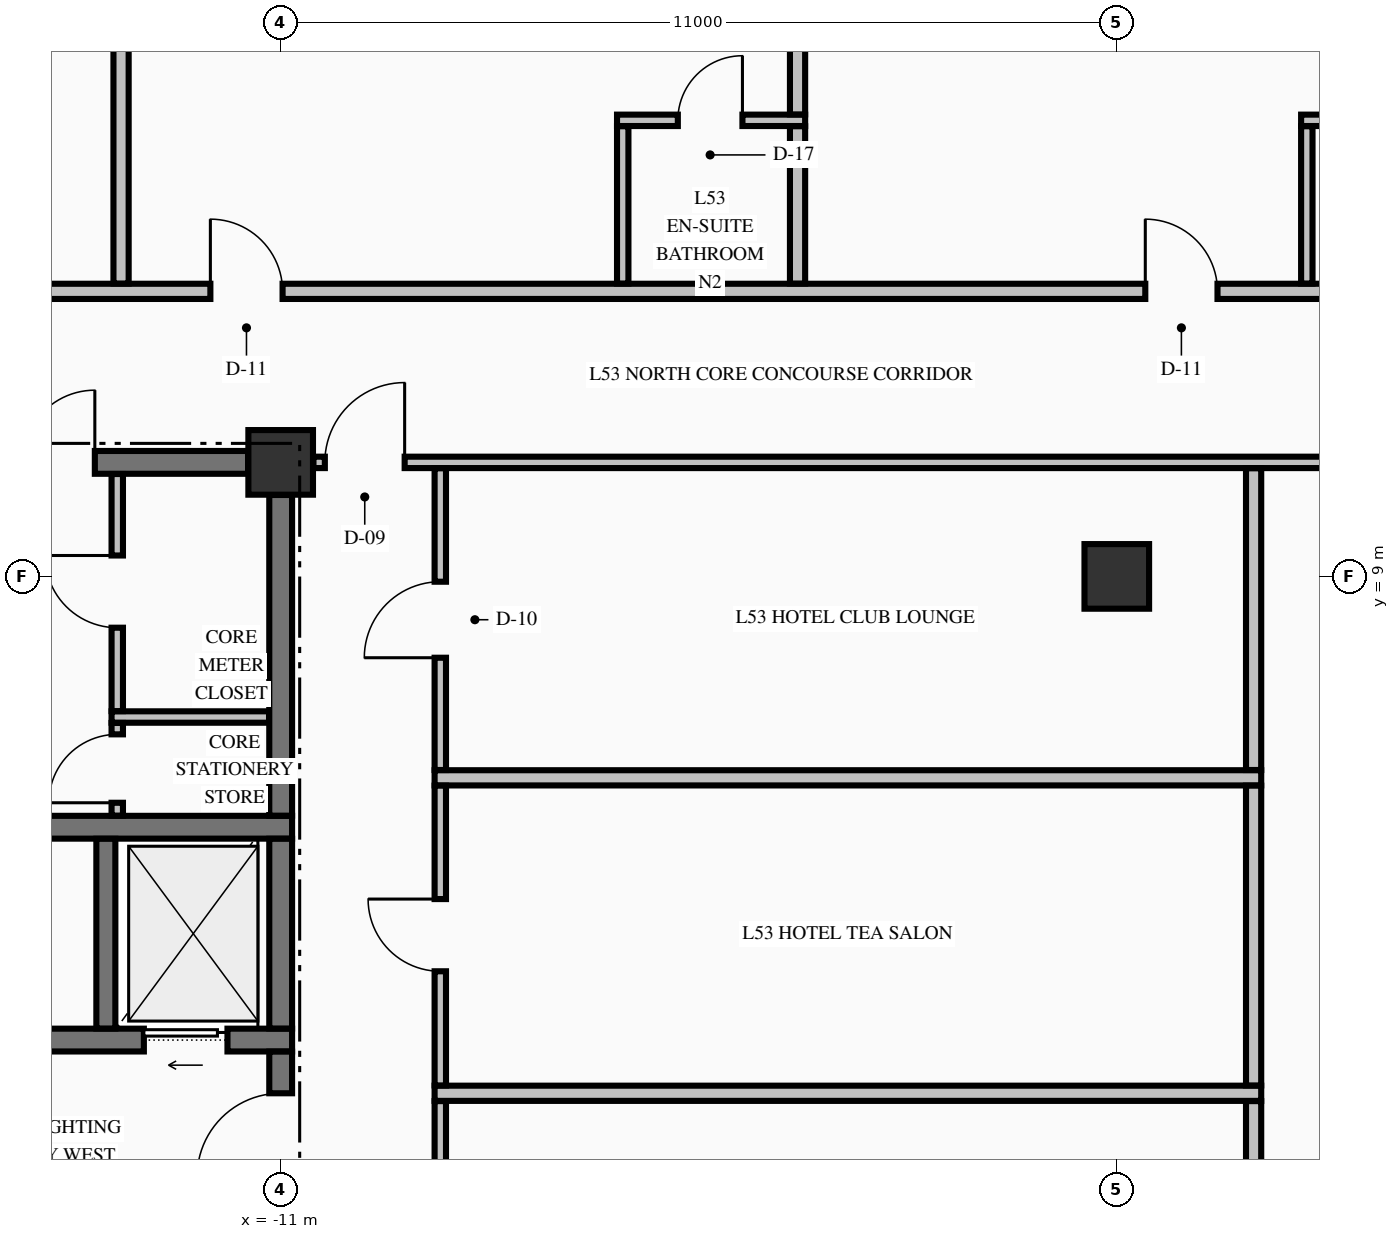
"""IFC4 building model, lengths in metres.
Left out: names, types, materials, properties, quantities, classifications, styles, units other than length and angle.
Written with IfcOpenShell. Run it as: python <this file> out.ifc"""

import sys

from ifc_helpers import new_model, si_unit, direction, frame, frame_2d, origin, origin_2d, place, context, subcontext, project, spatial, rectangle, extrude, element, fill, save


model = new_model("IFC4")
c1 = context("Model", 3, precision=1e-05, world=origin(), true_north=direction((0.0, 1.0)))
c2 = subcontext(c1, "Body", "Model", "MODEL_VIEW")
j1 = project(units=[si_unit("LENGTHUNIT", "METRE"), si_unit("PLANEANGLEUNIT", "RADIAN")], contexts=[c1])
p1 = place(None, origin())
s1 = spatial("IfcSite", under=j1, at=p1, CompositionType="ELEMENT")
p2 = place(p1, origin())
s2 = spatial("IfcBuilding", under=s1, at=p2, CompositionType="ELEMENT")
p3 = place(p2, frame((0.0, 0.0, 205.06)))
s3 = spatial("IfcBuildingStorey", under=s2, at=p3, CompositionType="ELEMENT", Elevation=205.06)
for number, where, z_axis, x_axis in (
    (1, (-11.0, 10.5, -0.25), (0.0, 0.0, 1.0), (1.0, 0.0, 0.0)),
    (2, (0.0, 9.0, -0.25), (0.0, 0.0, 1.0), (1.0, 0.0, 0.0)),
):
    element("IfcColumn", number, at=place(p3, frame(where, z_axis=z_axis, x_axis=x_axis)), inside=s3, PredefinedType="COLUMN", context=c2, shape_type="SweptSolid", body=[
        extrude(rectangle(XDim=0.85, YDim=0.85, at=origin_2d()), origin(), (0.0, 0.0, 1.0), 3.4),
    ])
p4 = place(p3, frame((-14.875, 2.9, 0.0), z_axis=(0.0, 0.0, 1.0), x_axis=(1.0, 0.0, 0.0)))
e3 = element("IfcWall", 3, at=p4, inside=s3, PredefinedType="SHEAR", context=c2, shape_type="SweptSolid", body=[
    extrude(rectangle(XDim=4.025, YDim=0.3, at=frame_2d((2.012, 0.0))), origin(), (0.0, 0.0, 1.0), 3.15),
])
p5 = place(p4, frame((2.075, 0.0, 0.0)))
e4 = element("IfcOpeningElement", 4, at=p5, cuts=e3, PredefinedType="OPENING", context=c2, shape_type="SweptSolid", body=[
    extrude(rectangle(XDim=1.1, YDim=2.2, at=frame_2d((0.55, 1.1))), frame((0.0, 0.16, 0.0), z_axis=(0.0, -1.0, 0.0), x_axis=(1.0, 0.0, 0.0)), (0.0, 0.0, 1.0), 0.32),
])
p6 = place(p3, frame((-14.875, 5.7, 0.0), z_axis=(0.0, 0.0, 1.0), x_axis=(1.0, 0.0, 0.0)))
e5 = element("IfcWall", 5, at=p6, inside=s3, PredefinedType="SHEAR", context=c2, shape_type="SweptSolid", body=[
    extrude(rectangle(XDim=4.025, YDim=0.3, at=frame_2d((2.012, 0.0))), origin(), (0.0, 0.0, 1.0), 3.15),
])
p7 = place(p3, frame((-14.7, 10.5, 0.0), z_axis=(0.0, 0.0, 1.0), x_axis=(1.0, 0.0, 0.0)))
e6 = element("IfcWall", 6, at=p7, inside=s3, PredefinedType="SHEAR", context=c2, shape_type="SweptSolid", body=[
    extrude(rectangle(XDim=3.271, YDim=0.3, at=frame_2d((1.635, 0.0))), origin(), (0.0, 0.0, 1.0), 3.15),
])
p8 = place(p7, frame((0.305, 0.0, 0.0)))
e7 = element("IfcOpeningElement", 7, at=p8, cuts=e6, PredefinedType="OPENING", context=c2, shape_type="SweptSolid", body=[
    extrude(rectangle(XDim=0.95, YDim=2.15, at=frame_2d((0.475, 1.075))), frame((0.0, 0.16, 0.0), z_axis=(0.0, -1.0, 0.0), x_axis=(1.0, 0.0, 0.0)), (0.0, 0.0, 1.0), 0.32),
])
for number, where, z_axis, x_axis in (
    (8, (-8.975, 2.2, 0.0), (0.0, 0.0, 1.0), (1.0, 0.0, 0.0)),
    (9, (-8.975, 6.35, 0.0), (0.0, 0.0, 1.0), (1.0, 0.0, 0.0)),
):
    element("IfcWall", number, at=place(p3, frame(where, z_axis=z_axis, x_axis=x_axis)), inside=s3, PredefinedType="PARTITIONING", context=c2, shape_type="SweptSolid", body=[
        extrude(rectangle(XDim=10.875, YDim=0.2, at=frame_2d((5.438, 0.0))), origin(), (0.0, 0.0, 1.0), 3.15),
    ])
p9 = place(p3, frame((-13.225, 7.15, 0.0), z_axis=(0.0, 0.0, 1.0), x_axis=(1.0, 0.0, 0.0)))
e10 = element("IfcWall", 10, at=p9, inside=s3, PredefinedType="PARTITIONING", context=c2, shape_type="SweptSolid", body=[
    extrude(rectangle(XDim=2.072, YDim=0.15, at=frame_2d((1.036, 0.0))), origin(), (0.0, 0.0, 1.0), 3.15),
])
p10 = place(p3, frame((-10.569, 10.5, 0.0), z_axis=(0.0, 0.0, 1.0), x_axis=(1.0, 0.0, 0.0)))
e11 = element("IfcWall", 11, at=p10, inside=s3, PredefinedType="PARTITIONING", context=c2, shape_type="SweptSolid", body=[
    extrude(rectangle(XDim=21.138, YDim=0.15, at=frame_2d((10.569, 0.0))), origin(), (0.0, 0.0, 1.0), 3.15),
])
p11 = place(p10, frame((0.15, 0.0, 0.0)))
e12 = element("IfcOpeningElement", 12, at=p11, cuts=e11, PredefinedType="OPENING", context=c2, shape_type="SweptSolid", body=[
    extrude(rectangle(XDim=1.05, YDim=2.15, at=frame_2d((0.525, 1.075))), frame((0.0, 0.085, 0.0), z_axis=(0.0, -1.0, 0.0), x_axis=(1.0, 0.0, 0.0)), (0.0, 0.0, 1.0), 0.17),
])
p12 = place(p10, frame((19.938, 0.0, 0.0)))
e13 = element("IfcOpeningElement", 13, at=p12, cuts=e11, PredefinedType="OPENING", context=c2, shape_type="SweptSolid", body=[
    extrude(rectangle(XDim=1.05, YDim=2.15, at=frame_2d((0.525, 1.075))), frame((0.0, 0.085, 0.0), z_axis=(0.0, -1.0, 0.0), x_axis=(1.0, 0.0, 0.0)), (0.0, 0.0, 1.0), 0.17),
])
p13 = place(p3, frame((-22.1, 12.75, 0.0), z_axis=(0.0, 0.0, 1.0), x_axis=(1.0, 0.0, 0.0)))
e14 = element("IfcWall", 14, at=p13, inside=s3, PredefinedType="PARTITIONING", context=c2, shape_type="SweptSolid", body=[
    extrude(rectangle(XDim=39.2, YDim=0.2, at=frame_2d((19.6, 0.0))), origin(), (0.0, 0.0, 1.0), 3.15),
])
p14 = place(p13, frame((5.125, 0.0, 0.0)))
e15 = element("IfcOpeningElement", 15, at=p14, cuts=e14, PredefinedType="OPENING", context=c2, shape_type="SweptSolid", body=[
    extrude(rectangle(XDim=1.05, YDim=2.15, at=frame_2d((0.525, 1.075))), frame((0.0, 0.11, 0.0), z_axis=(0.0, -1.0, 0.0), x_axis=(1.0, 0.0, 0.0)), (0.0, 0.0, 1.0), 0.22),
])
p15 = place(p13, frame((10.175, 0.0, 0.0)))
e16 = element("IfcOpeningElement", 16, at=p15, cuts=e14, PredefinedType="OPENING", context=c2, shape_type="SweptSolid", body=[
    extrude(rectangle(XDim=0.95, YDim=2.15, at=frame_2d((0.475, 1.075))), frame((0.0, 0.11, 0.0), z_axis=(0.0, -1.0, 0.0), x_axis=(1.0, 0.0, 0.0)), (0.0, 0.0, 1.0), 0.22),
])
p16 = place(p13, frame((22.475, 0.0, 0.0)))
e17 = element("IfcOpeningElement", 17, at=p16, cuts=e14, PredefinedType="OPENING", context=c2, shape_type="SweptSolid", body=[
    extrude(rectangle(XDim=0.95, YDim=2.15, at=frame_2d((0.475, 1.075))), frame((0.0, 0.11, 0.0), z_axis=(0.0, -1.0, 0.0), x_axis=(1.0, 0.0, 0.0)), (0.0, 0.0, 1.0), 0.22),
])
p17 = place(p13, frame((34.675, 0.0, 0.0)))
e18 = element("IfcOpeningElement", 18, at=p17, cuts=e14, PredefinedType="OPENING", context=c2, shape_type="SweptSolid", body=[
    extrude(rectangle(XDim=0.95, YDim=2.15, at=frame_2d((0.475, 1.075))), frame((0.0, 0.11, 0.0), z_axis=(0.0, -1.0, 0.0), x_axis=(1.0, 0.0, 0.0)), (0.0, 0.0, 1.0), 0.22),
])
p18 = place(p3, frame((-6.575, 15.0, 0.0), z_axis=(0.0, 0.0, 1.0), x_axis=(1.0, 0.0, 0.0)))
e19 = element("IfcWall", 19, at=p18, inside=s3, PredefinedType="PARTITIONING", context=c2, shape_type="SweptSolid", body=[
    extrude(rectangle(XDim=2.475, YDim=0.15, at=frame_2d((1.237, 0.0))), origin(), (0.0, 0.0, 1.0), 3.15),
])
p19 = place(p18, frame((0.8, 0.0, 0.0)))
e20 = element("IfcOpeningElement", 20, at=p19, cuts=e19, PredefinedType="OPENING", context=c2, shape_type="SweptSolid", body=[
    extrude(rectangle(XDim=0.85, YDim=2.1, at=frame_2d((0.425, 1.05))), frame((0.0, 0.085, 0.0), z_axis=(0.0, -1.0, 0.0), x_axis=(1.0, 0.0, 0.0)), (0.0, 0.0, 1.0), 0.17),
])
p20 = place(p3, frame((2.425, 15.0, 0.0), z_axis=(0.0, 0.0, 1.0), x_axis=(1.0, 0.0, 0.0)))
e21 = element("IfcWall", 21, at=p20, inside=s3, PredefinedType="PARTITIONING", context=c2, shape_type="SweptSolid", body=[
    extrude(rectangle(XDim=2.475, YDim=0.15, at=frame_2d((1.237, 0.0))), origin(), (0.0, 0.0, 1.0), 3.15),
])
p21 = place(p20, frame((0.8, 0.0, 0.0)))
e22 = element("IfcOpeningElement", 22, at=p21, cuts=e21, PredefinedType="OPENING", context=c2, shape_type="SweptSolid", body=[
    extrude(rectangle(XDim=0.85, YDim=2.1, at=frame_2d((0.425, 1.05))), frame((0.0, 0.085, 0.0), z_axis=(0.0, -1.0, 0.0), x_axis=(1.0, 0.0, 0.0)), (0.0, 0.0, 1.0), 0.17),
])
p22 = place(p3, frame((-13.3, 3.052, 0.0), z_axis=(0.0, 0.0, 1.0), x_axis=(0.0, 1.0, 0.0)))
e23 = element("IfcWall", 23, at=p22, inside=s3, PredefinedType="SOLIDWALL", context=c2, shape_type="SweptSolid", body=[
    extrude(rectangle(XDim=2.496, YDim=0.25, at=frame_2d((1.248, 0.0))), origin(), (0.0, 0.0, 1.0), 3.15),
])
p23 = place(p3, frame((-11.0, 0.429, 0.0), z_axis=(0.0, 0.0, 1.0), x_axis=(0.0, 1.0, 0.0)))
e24 = element("IfcWall", 24, at=p23, inside=s3, PredefinedType="SHEAR", context=c2, shape_type="SweptSolid", body=[
    extrude(rectangle(XDim=2.319, YDim=0.3, at=frame_2d((1.16, 0.0))), origin(), (0.0, 0.0, 1.0), 3.15),
])
p24 = place(p23, frame((0.671, 0.0, 0.0)))
e25 = element("IfcOpeningElement", 25, at=p24, cuts=e24, PredefinedType="OPENING", context=c2, shape_type="SweptSolid", body=[
    extrude(rectangle(XDim=1.1, YDim=2.15, at=frame_2d((0.55, 1.075))), frame((0.0, 0.16, 0.0), z_axis=(0.0, -1.0, 0.0), x_axis=(1.0, 0.0, 0.0)), (0.0, 0.0, 1.0), 0.32),
])
p25 = place(p3, frame((-11.0, 3.052, 0.0), z_axis=(0.0, 0.0, 1.0), x_axis=(0.0, 1.0, 0.0)))
e26 = element("IfcWall", 26, at=p25, inside=s3, PredefinedType="SHEAR", context=c2, shape_type="SweptSolid", body=[
    extrude(rectangle(XDim=2.496, YDim=0.3, at=frame_2d((1.248, 0.0))), origin(), (0.0, 0.0, 1.0), 3.15),
])
p26 = place(p3, frame((-11.0, 5.852, 0.0), z_axis=(0.0, 0.0, 1.0), x_axis=(0.0, 1.0, 0.0)))
e27 = element("IfcWall", 27, at=p26, inside=s3, PredefinedType="SHEAR", context=c2, shape_type="SweptSolid", body=[
    extrude(rectangle(XDim=4.219, YDim=0.3, at=frame_2d((2.109, 0.0))), origin(), (0.0, 0.0, 1.0), 3.15),
])
p27 = place(p3, frame((-13.15, 5.853, 0.0), z_axis=(0.0, 0.0, 1.0), x_axis=(0.0, 1.0, 0.0)))
e28 = element("IfcWall", 28, at=p27, inside=s3, PredefinedType="PARTITIONING", context=c2, shape_type="SweptSolid", body=[
    extrude(rectangle(XDim=1.219, YDim=0.15, at=frame_2d((0.609, 0.0))), origin(), (0.0, 0.0, 1.0), 3.15),
])
p28 = place(p27, frame((0.169, 0.0, 0.0)))
e29 = element("IfcOpeningElement", 29, at=p28, cuts=e28, PredefinedType="OPENING", context=c2, shape_type="SweptSolid", body=[
    extrude(rectangle(XDim=0.9, YDim=2.15, at=frame_2d((0.45, 1.075))), frame((0.0, 0.085, 0.0), z_axis=(0.0, -1.0, 0.0), x_axis=(1.0, 0.0, 0.0)), (0.0, 0.0, 1.0), 0.17),
])
p29 = place(p3, frame((-13.15, 7.228, 0.0), z_axis=(0.0, 0.0, 1.0), x_axis=(0.0, 1.0, 0.0)))
e30 = element("IfcWall", 30, at=p29, inside=s3, PredefinedType="PARTITIONING", context=c2, shape_type="SweptSolid", body=[
    extrude(rectangle(XDim=3.119, YDim=0.15, at=frame_2d((1.56, 0.0))), origin(), (0.0, 0.0, 1.0), 3.15),
])
p30 = place(p29, frame((1.097, 0.0, 0.0)))
e31 = element("IfcOpeningElement", 31, at=p30, cuts=e30, PredefinedType="OPENING", context=c2, shape_type="SweptSolid", body=[
    extrude(rectangle(XDim=0.95, YDim=2.15, at=frame_2d((0.475, 1.075))), frame((0.0, 0.085, 0.0), z_axis=(0.0, -1.0, 0.0), x_axis=(1.0, 0.0, 0.0)), (0.0, 0.0, 1.0), 0.17),
])
p31 = place(p3, frame((-13.1, 12.853, 0.0), z_axis=(0.0, 0.0, 1.0), x_axis=(0.0, 1.0, 0.0)))
e32 = element("IfcWall", 32, at=p31, inside=s3, PredefinedType="PARTITIONING", context=c2, shape_type="SweptSolid", body=[
    extrude(rectangle(XDim=11.482, YDim=0.2, at=frame_2d((5.741, 0.0))), origin(), (0.0, 0.0, 1.0), 3.15),
])
p32 = place(p3, frame((-8.9, -9.872, 0.0), z_axis=(0.0, 0.0, 1.0), x_axis=(0.0, 1.0, 0.0)))
e33 = element("IfcWall", 33, at=p32, inside=s3, PredefinedType="PARTITIONING", context=c2, shape_type="SweptSolid", body=[
    extrude(rectangle(XDim=11.969, YDim=0.15, at=frame_2d((5.984, 0.0))), origin(), (0.0, 0.0, 1.0), 3.15),
])
p33 = place(p32, frame((5.502, 0.0, 0.0)))
e34 = element("IfcOpeningElement", 34, at=p33, cuts=e33, PredefinedType="OPENING", context=c2, shape_type="SweptSolid", body=[
    extrude(rectangle(XDim=1.0, YDim=2.15, at=frame_2d((0.5, 1.075))), frame((0.0, 0.085, 0.0), z_axis=(0.0, -1.0, 0.0), x_axis=(1.0, 0.0, 0.0)), (0.0, 0.0, 1.0), 0.17),
])
p34 = place(p3, frame((-8.9, 2.303, 0.0), z_axis=(0.0, 0.0, 1.0), x_axis=(0.0, 1.0, 0.0)))
e35 = element("IfcWall", 35, at=p34, inside=s3, PredefinedType="PARTITIONING", context=c2, shape_type="SweptSolid", body=[
    extrude(rectangle(XDim=3.944, YDim=0.15, at=frame_2d((1.972, 0.0))), origin(), (0.0, 0.0, 1.0), 3.15),
])
p35 = place(p34, frame((1.502, 0.0, 0.0)))
e36 = element("IfcOpeningElement", 36, at=p35, cuts=e35, PredefinedType="OPENING", context=c2, shape_type="SweptSolid", body=[
    extrude(rectangle(XDim=0.95, YDim=2.15, at=frame_2d((0.475, 1.075))), frame((0.0, 0.085, 0.0), z_axis=(0.0, -1.0, 0.0), x_axis=(1.0, 0.0, 0.0)), (0.0, 0.0, 1.0), 0.17),
])
p36 = place(p3, frame((-8.9, 6.453, 0.0), z_axis=(0.0, 0.0, 1.0), x_axis=(0.0, 1.0, 0.0)))
e37 = element("IfcWall", 37, at=p36, inside=s3, PredefinedType="PARTITIONING", context=c2, shape_type="SweptSolid", body=[
    extrude(rectangle(XDim=3.969, YDim=0.15, at=frame_2d((1.985, 0.0))), origin(), (0.0, 0.0, 1.0), 3.15),
])
p37 = place(p36, frame((1.477, 0.0, 0.0)))
e38 = element("IfcOpeningElement", 38, at=p37, cuts=e37, PredefinedType="OPENING", context=c2, shape_type="SweptSolid", body=[
    extrude(rectangle(XDim=1.0, YDim=2.15, at=frame_2d((0.5, 1.075))), frame((0.0, 0.085, 0.0), z_axis=(0.0, -1.0, 0.0), x_axis=(1.0, 0.0, 0.0)), (0.0, 0.0, 1.0), 0.17),
])
p38 = place(p3, frame((-6.5, 12.853, 0.0), z_axis=(0.0, 0.0, 1.0), x_axis=(0.0, 1.0, 0.0)))
e39 = element("IfcWall", 39, at=p38, inside=s3, PredefinedType="PARTITIONING", context=c2, shape_type="SweptSolid", body=[
    extrude(rectangle(XDim=2.069, YDim=0.15, at=frame_2d((1.035, 0.0))), origin(), (0.0, 0.0, 1.0), 3.15),
])
p39 = place(p3, frame((-4.2, 12.853, 0.0), z_axis=(0.0, 0.0, 1.0), x_axis=(0.0, 1.0, 0.0)))
e40 = element("IfcWall", 40, at=p39, inside=s3, PredefinedType="PARTITIONING", context=c2, shape_type="SweptSolid", body=[
    extrude(rectangle(XDim=2.069, YDim=0.2, at=frame_2d((1.035, 0.0))), origin(), (0.0, 0.0, 1.0), 3.15),
])
p40 = place(p3, frame((-4.2, 15.078, 0.0), z_axis=(0.0, 0.0, 1.0), x_axis=(0.0, 1.0, 0.0)))
e41 = element("IfcWall", 41, at=p40, inside=s3, PredefinedType="PARTITIONING", context=c2, shape_type="SweptSolid", body=[
    extrude(rectangle(XDim=9.257, YDim=0.2, at=frame_2d((4.628, 0.0))), origin(), (0.0, 0.0, 1.0), 3.15),
])
p41 = place(p3, frame((1.8, -1.497, 0.0), z_axis=(0.0, 0.0, 1.0), x_axis=(0.0, 1.0, 0.0)))
e42 = element("IfcWall", 42, at=p41, inside=s3, PredefinedType="PARTITIONING", context=c2, shape_type="SweptSolid", body=[
    extrude(rectangle(XDim=3.594, YDim=0.2, at=frame_2d((1.797, 0.0))), origin(), (0.0, 0.0, 1.0), 3.15),
])
p42 = place(p3, frame((1.8, 2.303, 0.0), z_axis=(0.0, 0.0, 1.0), x_axis=(0.0, 1.0, 0.0)))
e43 = element("IfcWall", 43, at=p42, inside=s3, PredefinedType="PARTITIONING", context=c2, shape_type="SweptSolid", body=[
    extrude(rectangle(XDim=3.944, YDim=0.2, at=frame_2d((1.972, 0.0))), origin(), (0.0, 0.0, 1.0), 3.15),
])
p43 = place(p3, frame((1.8, 6.453, 0.0), z_axis=(0.0, 0.0, 1.0), x_axis=(0.0, 1.0, 0.0)))
e44 = element("IfcWall", 44, at=p43, inside=s3, PredefinedType="PARTITIONING", context=c2, shape_type="SweptSolid", body=[
    extrude(rectangle(XDim=3.969, YDim=0.2, at=frame_2d((1.985, 0.0))), origin(), (0.0, 0.0, 1.0), 3.15),
])
p44 = place(p3, frame((2.5, 12.853, 0.0), z_axis=(0.0, 0.0, 1.0), x_axis=(0.0, 1.0, 0.0)))
e45 = element("IfcWall", 45, at=p44, inside=s3, PredefinedType="PARTITIONING", context=c2, shape_type="SweptSolid", body=[
    extrude(rectangle(XDim=2.069, YDim=0.15, at=frame_2d((1.035, 0.0))), origin(), (0.0, 0.0, 1.0), 3.15),
])
p45 = place(p24, origin())
e46 = element("IfcDoor", 46, at=p45, inside=s3, OperationType="SINGLE_SWING_LEFT", PredefinedType="DOOR", context=c2, shape_type="SweptSolid", body=[
    extrude(rectangle(XDim=1.1, YDim=2.15, at=frame_2d((0.55, 1.075))), frame((0.0, 0.025, 0.0), z_axis=(0.0, -1.0, 0.0), x_axis=(1.0, 0.0, 0.0)), (0.0, 0.0, 1.0), 0.05),
])
fill(e25, e46)
p46 = place(p5, origin())
e47 = element("IfcDoor", 47, at=p46, inside=s3, OperationType="SLIDING_TO_LEFT", PredefinedType="DOOR", context=c2, shape_type="SweptSolid", body=[
    extrude(rectangle(XDim=1.1, YDim=2.2, at=frame_2d((0.55, 1.1))), frame((0.0, 0.025, 0.0), z_axis=(0.0, -1.0, 0.0), x_axis=(1.0, 0.0, 0.0)), (0.0, 0.0, 1.0), 0.05),
])
fill(e4, e47)
p47 = place(p8, origin())
e48 = element("IfcDoor", 48, at=p47, inside=s3, OperationType="SINGLE_SWING_RIGHT", PredefinedType="DOOR", context=c2, shape_type="SweptSolid", body=[
    extrude(rectangle(XDim=0.95, YDim=2.15, at=frame_2d((0.475, 1.075))), frame((0.0, 0.025, 0.0), z_axis=(0.0, -1.0, 0.0), x_axis=(1.0, 0.0, 0.0)), (0.0, 0.0, 1.0), 0.05),
])
fill(e7, e48)
p48 = place(p28, origin())
e49 = element("IfcDoor", 49, at=p48, inside=s3, OperationType="SINGLE_SWING_LEFT", PredefinedType="DOOR", context=c2, shape_type="SweptSolid", body=[
    extrude(rectangle(XDim=0.9, YDim=2.15, at=frame_2d((0.45, 1.075))), frame((0.0, 0.025, 0.0), z_axis=(0.0, -1.0, 0.0), x_axis=(1.0, 0.0, 0.0)), (0.0, 0.0, 1.0), 0.05),
])
fill(e29, e49)
p49 = place(p30, origin())
e50 = element("IfcDoor", 50, at=p49, inside=s3, OperationType="SINGLE_SWING_RIGHT", PredefinedType="DOOR", context=c2, shape_type="SweptSolid", body=[
    extrude(rectangle(XDim=0.95, YDim=2.15, at=frame_2d((0.475, 1.075))), frame((0.0, 0.025, 0.0), z_axis=(0.0, -1.0, 0.0), x_axis=(1.0, 0.0, 0.0)), (0.0, 0.0, 1.0), 0.05),
])
fill(e31, e50)
p50 = place(p11, origin())
e51 = element("IfcDoor", 51, at=p50, inside=s3, OperationType="SINGLE_SWING_RIGHT", PredefinedType="DOOR", context=c2, shape_type="SweptSolid", body=[
    extrude(rectangle(XDim=1.05, YDim=2.15, at=frame_2d((0.525, 1.075))), frame((0.0, 0.025, 0.0), z_axis=(0.0, -1.0, 0.0), x_axis=(1.0, 0.0, 0.0)), (0.0, 0.0, 1.0), 0.05),
])
fill(e12, e51)
p51 = place(p15, origin())
e52 = element("IfcDoor", 52, at=p51, inside=s3, OperationType="SINGLE_SWING_LEFT", PredefinedType="DOOR", context=c2, shape_type="SweptSolid", body=[
    extrude(rectangle(XDim=0.95, YDim=2.15, at=frame_2d((0.475, 1.075))), frame((0.0, 0.025, 0.0), z_axis=(0.0, -1.0, 0.0), x_axis=(1.0, 0.0, 0.0)), (0.0, 0.0, 1.0), 0.05),
])
fill(e16, e52)
p52 = place(p19, origin())
e53 = element("IfcDoor", 53, at=p52, inside=s3, OperationType="SINGLE_SWING_RIGHT", PredefinedType="DOOR", context=c2, shape_type="SweptSolid", body=[
    extrude(rectangle(XDim=0.85, YDim=2.1, at=frame_2d((0.425, 1.05))), frame((0.0, 0.025, 0.0), z_axis=(0.0, -1.0, 0.0), x_axis=(1.0, 0.0, 0.0)), (0.0, 0.0, 1.0), 0.05),
])
fill(e20, e53)
p53 = place(p16, origin())
e54 = element("IfcDoor", 54, at=p53, inside=s3, OperationType="SINGLE_SWING_LEFT", PredefinedType="DOOR", context=c2, shape_type="SweptSolid", body=[
    extrude(rectangle(XDim=0.95, YDim=2.15, at=frame_2d((0.475, 1.075))), frame((0.0, 0.025, 0.0), z_axis=(0.0, -1.0, 0.0), x_axis=(1.0, 0.0, 0.0)), (0.0, 0.0, 1.0), 0.05),
])
fill(e17, e54)
p54 = place(p37, origin())
e55 = element("IfcDoor", 55, at=p54, inside=s3, OperationType="SINGLE_SWING_LEFT", PredefinedType="DOOR", context=c2, shape_type="SweptSolid", body=[
    extrude(rectangle(XDim=1.0, YDim=2.15, at=frame_2d((0.5, 1.075))), frame((0.0, 0.025, 0.0), z_axis=(0.0, -1.0, 0.0), x_axis=(1.0, 0.0, 0.0)), (0.0, 0.0, 1.0), 0.05),
])
fill(e38, e55)
p55 = place(p35, origin())
e56 = element("IfcDoor", 56, at=p55, inside=s3, OperationType="SINGLE_SWING_RIGHT", PredefinedType="DOOR", context=c2, shape_type="SweptSolid", body=[
    extrude(rectangle(XDim=0.95, YDim=2.15, at=frame_2d((0.475, 1.075))), frame((0.0, 0.025, 0.0), z_axis=(0.0, -1.0, 0.0), x_axis=(1.0, 0.0, 0.0)), (0.0, 0.0, 1.0), 0.05),
])
fill(e36, e56)
save(model, sys.argv[1])
